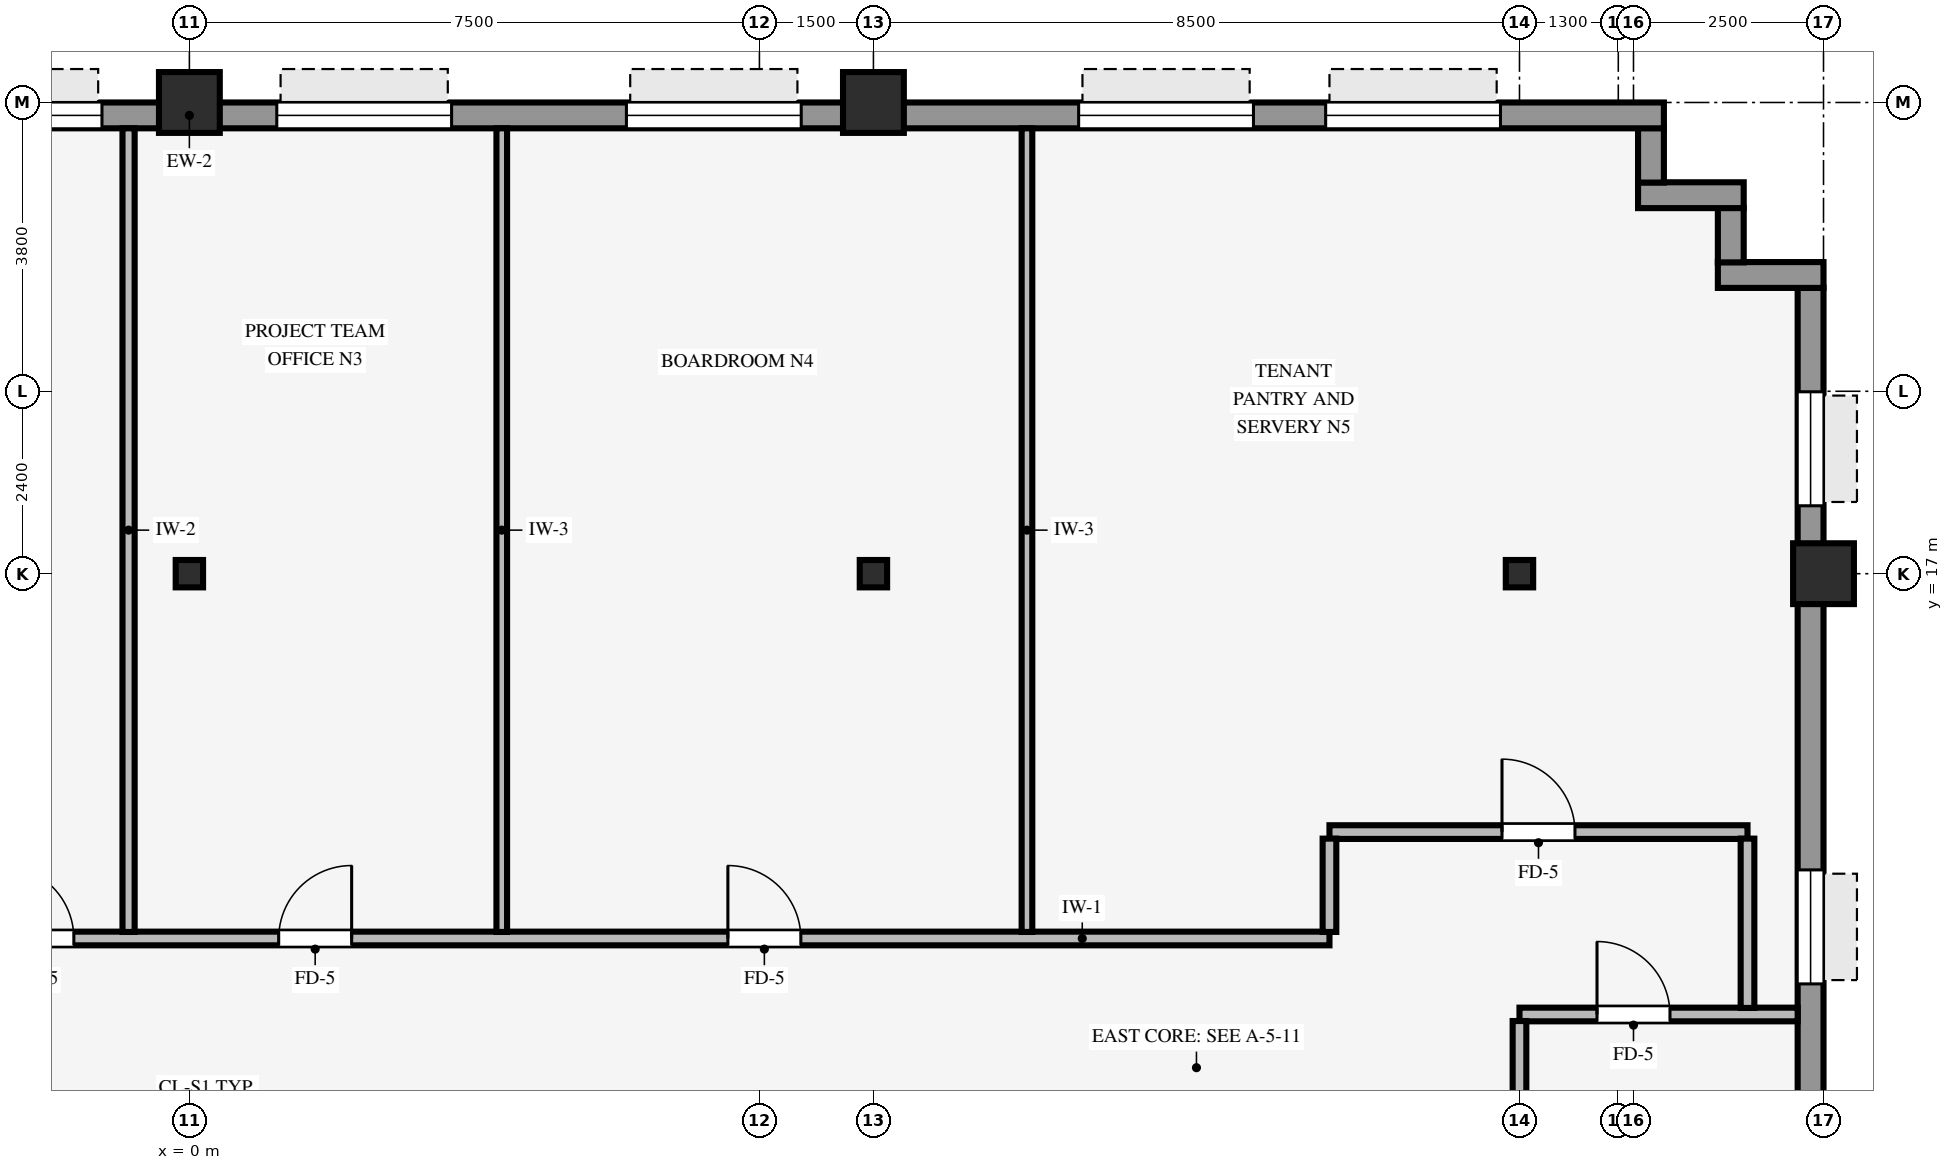
"""IFC4 building model, lengths in metres.
Left out: names, types, materials, properties, quantities, classifications, styles, units other than length and angle.
Written with IfcOpenShell. Run it as: python <this file> out.ifc"""

import sys

from ifc_helpers import new_model, si_unit, direction, frame, frame_2d, origin, origin_2d, place, context, subcontext, project, spatial, rectangle, hollow_rectangle, i_section, extrude, source, transform, mapped, element, fill, save


model = new_model("IFC4")
c1 = context("Model", 3, precision=1e-05, world=origin(), true_north=direction((0.0, 1.0)))
c2 = subcontext(c1, "Body", "Model", "MODEL_VIEW")
j1 = project(units=[si_unit("LENGTHUNIT", "METRE"), si_unit("PLANEANGLEUNIT", "RADIAN")], contexts=[c1])
p1 = place(None, origin())
s1 = spatial("IfcSite", under=j1, at=p1, CompositionType="ELEMENT")
p2 = place(p1, origin())
s2 = spatial("IfcBuilding", under=s1, at=p2, CompositionType="ELEMENT")
p3 = place(p2, frame((0.0, 0.0, 71.4)))
s3 = spatial("IfcBuildingStorey", under=s2, at=p3, CompositionType="ELEMENT", Elevation=71.4)
for number, where, z_axis, x_axis in (
    (1, (21.5, 17.0, 0.0), (0.0, 0.0, 1.0), (1.0, 0.0, 0.0)),
    (2, (0.0, 23.2, 0.0), (0.0, 0.0, 1.0), (1.0, 0.0, 0.0)),
    (3, (9.0, 23.2, 0.0), (0.0, 0.0, 1.0), (1.0, 0.0, 0.0)),
):
    element("IfcColumn", number, at=place(p3, frame(where, z_axis=z_axis, x_axis=x_axis)), inside=s3, PredefinedType="COLUMN", context=c2, shape_type="SweptSolid", body=[
        extrude(hollow_rectangle(XDim=0.8, YDim=0.8, WallThickness=0.055, InnerFilletRadius=0.055, OuterFilletRadius=0.11, at=origin_2d()), origin(), (0.0, 0.0, 1.0), 3.37),
    ])
for number, where, z_axis, x_axis in (
    (4, (0.0, 17.0, 0.0), (0.0, 0.0, 1.0), (1.0, 0.0, 0.0)),
    (5, (9.0, 17.0, 0.0), (0.0, 0.0, 1.0), (1.0, 0.0, 0.0)),
    (6, (17.5, 17.0, 0.0), (0.0, 0.0, 1.0), (1.0, 0.0, 0.0)),
):
    element("IfcColumn", number, at=place(p3, frame(where, z_axis=z_axis, x_axis=x_axis)), inside=s3, PredefinedType="COLUMN", context=c2, shape_type="SweptSolid", body=[
        extrude(i_section(OverallWidth=0.36, OverallDepth=0.36, WebThickness=0.021, FlangeThickness=0.021, FilletRadius=0.018, at=origin_2d()), origin(), (0.0, 0.0, 1.0), 3.37),
    ])
p4 = place(p3, frame((21.33, -20.764, 0.0), z_axis=(0.0, 0.0, 1.0), x_axis=(0.0, 1.0, 0.0)))
e7 = element("IfcWall", 7, at=p4, inside=s3, PredefinedType="STANDARD", context=c2, shape_type="SweptSolid", body=[
    extrude(rectangle(XDim=41.528, YDim=0.34, at=frame_2d((20.764, 0.0))), origin(), (0.0, 0.0, 1.0), 2.705),
])
p5 = place(p4, frame((26.014, 0.0, 0.0), z_axis=(0.0, 0.0, 1.0), x_axis=(-1.0, 0.0, 0.0)))
e8 = element("IfcOpeningElement", 8, at=p5, cuts=e7, PredefinedType="OPENING", context=c2, shape_type="SweptSolid", body=[
    extrude(rectangle(XDim=1.05, YDim=2.1, at=frame_2d((0.525, 1.05))), frame((0.0, 0.18, 0.0), z_axis=(0.0, -1.0, 0.0), x_axis=(1.0, 0.0, 0.0)), (0.0, 0.0, 1.0), 0.36),
])
p6 = place(p4, frame((1.371, 0.0, 0.8)))
e9 = element("IfcOpeningElement", 9, at=p6, cuts=e7, PredefinedType="OPENING", context=c2, shape_type="SweptSolid", body=[
    extrude(rectangle(XDim=1.5, YDim=1.6, at=frame_2d((0.75, 0.8))), frame((0.0, 0.18, 0.0), z_axis=(0.0, -1.0, 0.0), x_axis=(1.0, 0.0, 0.0)), (0.0, 0.0, 1.0), 0.36),
])
p7 = place(p4, frame((7.662, 0.0, 0.8)))
e10 = element("IfcOpeningElement", 10, at=p7, cuts=e7, PredefinedType="OPENING", context=c2, shape_type="SweptSolid", body=[
    extrude(rectangle(XDim=1.5, YDim=1.6, at=frame_2d((0.75, 0.8))), frame((0.0, 0.18, 0.0), z_axis=(0.0, -1.0, 0.0), x_axis=(1.0, 0.0, 0.0)), (0.0, 0.0, 1.0), 0.36),
])
p8 = place(p4, frame((12.603, 0.0, 0.8)))
e11 = element("IfcOpeningElement", 11, at=p8, cuts=e7, PredefinedType="OPENING", context=c2, shape_type="SweptSolid", body=[
    extrude(rectangle(XDim=1.5, YDim=1.6, at=frame_2d((0.75, 0.8))), frame((0.0, 0.18, 0.0), z_axis=(0.0, -1.0, 0.0), x_axis=(1.0, 0.0, 0.0)), (0.0, 0.0, 1.0), 0.36),
])
p9 = place(p4, frame((17.543, 0.0, 0.8)))
e12 = element("IfcOpeningElement", 12, at=p9, cuts=e7, PredefinedType="OPENING", context=c2, shape_type="SweptSolid", body=[
    extrude(rectangle(XDim=1.5, YDim=1.6, at=frame_2d((0.75, 0.8))), frame((0.0, 0.18, 0.0), z_axis=(0.0, -1.0, 0.0), x_axis=(1.0, 0.0, 0.0)), (0.0, 0.0, 1.0), 0.36),
])
p10 = place(p4, frame((22.485, 0.0, 0.8)))
e13 = element("IfcOpeningElement", 13, at=p10, cuts=e7, PredefinedType="OPENING", context=c2, shape_type="SweptSolid", body=[
    extrude(rectangle(XDim=1.5, YDim=1.6, at=frame_2d((0.75, 0.8))), frame((0.0, 0.18, 0.0), z_axis=(0.0, -1.0, 0.0), x_axis=(1.0, 0.0, 0.0)), (0.0, 0.0, 1.0), 0.36),
])
p11 = place(p4, frame((27.426, 0.0, 0.8)))
e14 = element("IfcOpeningElement", 14, at=p11, cuts=e7, PredefinedType="OPENING", context=c2, shape_type="SweptSolid", body=[
    extrude(rectangle(XDim=1.5, YDim=1.6, at=frame_2d((0.75, 0.8))), frame((0.0, 0.18, 0.0), z_axis=(0.0, -1.0, 0.0), x_axis=(1.0, 0.0, 0.0)), (0.0, 0.0, 1.0), 0.36),
])
p12 = place(p4, frame((32.366, 0.0, 0.8)))
e15 = element("IfcOpeningElement", 15, at=p12, cuts=e7, PredefinedType="OPENING", context=c2, shape_type="SweptSolid", body=[
    extrude(rectangle(XDim=1.5, YDim=1.6, at=frame_2d((0.75, 0.8))), frame((0.0, 0.18, 0.0), z_axis=(0.0, -1.0, 0.0), x_axis=(1.0, 0.0, 0.0)), (0.0, 0.0, 1.0), 0.36),
])
p13 = place(p4, frame((38.657, 0.0, 0.8)))
e16 = element("IfcOpeningElement", 16, at=p13, cuts=e7, PredefinedType="OPENING", context=c2, shape_type="SweptSolid", body=[
    extrude(rectangle(XDim=1.5, YDim=1.6, at=frame_2d((0.75, 0.8))), frame((0.0, 0.18, 0.0), z_axis=(0.0, -1.0, 0.0), x_axis=(1.0, 0.0, 0.0)), (0.0, 0.0, 1.0), 0.36),
])
p14 = place(p3, frame((20.11, 20.93, 0.0), z_axis=(0.0, 0.0, 1.0), x_axis=(1.0, 0.0, 0.0)))
e17 = element("IfcWall", 17, at=p14, inside=s3, PredefinedType="STANDARD", context=c2, shape_type="SweptSolid", body=[
    extrude(rectangle(XDim=1.39, YDim=0.34, at=frame_2d((0.695, 0.0))), origin(), (0.0, 0.0, 1.0), 3.36),
])
p15 = place(p3, frame((20.28, 21.096, 0.0), z_axis=(0.0, 0.0, 1.0), x_axis=(0.0, 1.0, 0.0)))
e18 = element("IfcWall", 18, at=p15, inside=s3, PredefinedType="STANDARD", context=c2, shape_type="SweptSolid", body=[
    extrude(rectangle(XDim=0.718, YDim=0.34, at=frame_2d((0.359, 0.0))), origin(), (0.0, 0.0, 1.0), 3.36),
])
p16 = place(p3, frame((19.06, 21.98, 0.0), z_axis=(0.0, 0.0, 1.0), x_axis=(1.0, 0.0, 0.0)))
e19 = element("IfcWall", 19, at=p16, inside=s3, PredefinedType="STANDARD", context=c2, shape_type="SweptSolid", body=[
    extrude(rectangle(XDim=1.39, YDim=0.34, at=frame_2d((0.695, 0.0))), origin(), (0.0, 0.0, 1.0), 3.36),
])
p17 = place(p3, frame((19.23, 22.146, 0.0), z_axis=(0.0, 0.0, 1.0), x_axis=(0.0, 1.0, 0.0)))
e20 = element("IfcWall", 20, at=p17, inside=s3, PredefinedType="STANDARD", context=c2, shape_type="SweptSolid", body=[
    extrude(rectangle(XDim=0.718, YDim=0.34, at=frame_2d((0.359, 0.0))), origin(), (0.0, 0.0, 1.0), 3.36),
])
p18 = place(p3, frame((-19.4, 23.03, 0.0), z_axis=(0.0, 0.0, 1.0), x_axis=(1.0, 0.0, 0.0)))
e21 = element("IfcWall", 21, at=p18, inside=s3, PredefinedType="STANDARD", context=c2, shape_type="SweptSolid", body=[
    extrude(rectangle(XDim=38.8, YDim=0.34, at=frame_2d((19.4, 0.0))), origin(), (0.0, 0.0, 1.0), 2.705),
])
p19 = place(p18, frame((2.15, 0.0, 0.8)))
e22 = element("IfcOpeningElement", 22, at=p19, cuts=e21, PredefinedType="OPENING", context=c2, shape_type="SweptSolid", body=[
    extrude(rectangle(XDim=2.3, YDim=1.62, at=frame_2d((1.15, 0.81))), frame((0.0, 0.18, 0.0), z_axis=(0.0, -1.0, 0.0), x_axis=(1.0, 0.0, 0.0)), (0.0, 0.0, 1.0), 0.36),
])
p20 = place(p18, frame((6.75, 0.0, 0.8)))
e23 = element("IfcOpeningElement", 23, at=p20, cuts=e21, PredefinedType="OPENING", context=c2, shape_type="SweptSolid", body=[
    extrude(rectangle(XDim=2.3, YDim=1.62, at=frame_2d((1.15, 0.81))), frame((0.0, 0.18, 0.0), z_axis=(0.0, -1.0, 0.0), x_axis=(1.0, 0.0, 0.0)), (0.0, 0.0, 1.0), 0.36),
])
p21 = place(p18, frame((11.35, 0.0, 0.8)))
e24 = element("IfcOpeningElement", 24, at=p21, cuts=e21, PredefinedType="OPENING", context=c2, shape_type="SweptSolid", body=[
    extrude(rectangle(XDim=2.3, YDim=1.62, at=frame_2d((1.15, 0.81))), frame((0.0, 0.18, 0.0), z_axis=(0.0, -1.0, 0.0), x_axis=(1.0, 0.0, 0.0)), (0.0, 0.0, 1.0), 0.36),
])
p22 = place(p18, frame((15.95, 0.0, 0.8)))
e25 = element("IfcOpeningElement", 25, at=p22, cuts=e21, PredefinedType="OPENING", context=c2, shape_type="SweptSolid", body=[
    extrude(rectangle(XDim=2.3, YDim=1.62, at=frame_2d((1.15, 0.81))), frame((0.0, 0.18, 0.0), z_axis=(0.0, -1.0, 0.0), x_axis=(1.0, 0.0, 0.0)), (0.0, 0.0, 1.0), 0.36),
])
p23 = place(p18, frame((20.55, 0.0, 0.8)))
e26 = element("IfcOpeningElement", 26, at=p23, cuts=e21, PredefinedType="OPENING", context=c2, shape_type="SweptSolid", body=[
    extrude(rectangle(XDim=2.3, YDim=1.62, at=frame_2d((1.15, 0.81))), frame((0.0, 0.18, 0.0), z_axis=(0.0, -1.0, 0.0), x_axis=(1.0, 0.0, 0.0)), (0.0, 0.0, 1.0), 0.36),
])
p24 = place(p18, frame((25.15, 0.0, 0.8)))
e27 = element("IfcOpeningElement", 27, at=p24, cuts=e21, PredefinedType="OPENING", context=c2, shape_type="SweptSolid", body=[
    extrude(rectangle(XDim=2.3, YDim=1.62, at=frame_2d((1.15, 0.81))), frame((0.0, 0.18, 0.0), z_axis=(0.0, -1.0, 0.0), x_axis=(1.0, 0.0, 0.0)), (0.0, 0.0, 1.0), 0.36),
])
p25 = place(p18, frame((31.1, 0.0, 0.8)))
e28 = element("IfcOpeningElement", 28, at=p25, cuts=e21, PredefinedType="OPENING", context=c2, shape_type="SweptSolid", body=[
    extrude(rectangle(XDim=2.3, YDim=1.62, at=frame_2d((1.15, 0.81))), frame((0.0, 0.18, 0.0), z_axis=(0.0, -1.0, 0.0), x_axis=(1.0, 0.0, 0.0)), (0.0, 0.0, 1.0), 0.36),
])
p26 = place(p18, frame((34.35, 0.0, 0.8)))
e29 = element("IfcOpeningElement", 29, at=p26, cuts=e21, PredefinedType="OPENING", context=c2, shape_type="SweptSolid", body=[
    extrude(rectangle(XDim=2.3, YDim=1.62, at=frame_2d((1.15, 0.81))), frame((0.0, 0.18, 0.0), z_axis=(0.0, -1.0, 0.0), x_axis=(1.0, 0.0, 0.0)), (0.0, 0.0, 1.0), 0.36),
])
p27 = place(p3, frame((17.5, 11.2, 0.0), z_axis=(0.0, 0.0, 1.0), x_axis=(1.0, 0.0, 0.0)))
e30 = element("IfcWall", 30, at=p27, inside=s3, PredefinedType="PARTITIONING", context=c2, shape_type="SweptSolid", body=[
    extrude(rectangle(XDim=3.66, YDim=0.18, at=frame_2d((1.83, 0.0))), origin(), (0.0, 0.0, 1.0), 3.36),
])
p28 = place(p27, frame((1.02, 0.0, 0.0)))
e31 = element("IfcOpeningElement", 31, at=p28, cuts=e30, PredefinedType="OPENING", context=c2, shape_type="SweptSolid", body=[
    extrude(rectangle(XDim=0.96, YDim=2.1, at=frame_2d((0.48, 1.05))), frame((0.0, 0.1, 0.0), z_axis=(0.0, -1.0, 0.0), x_axis=(1.0, 0.0, 0.0)), (0.0, 0.0, 1.0), 0.2),
])
p29 = place(p3, frame((-15.0, 12.2, 0.0), z_axis=(0.0, 0.0, 1.0), x_axis=(1.0, 0.0, 0.0)))
e32 = element("IfcWall", 32, at=p29, inside=s3, PredefinedType="PARTITIONING", context=c2, shape_type="SweptSolid", body=[
    extrude(rectangle(XDim=30.0, YDim=0.18, at=frame_2d((15.0, 0.0))), origin(), (0.0, 0.0, 1.0), 3.36),
])
p30 = place(p29, frame((22.085, 0.0, 0.0)))
e33 = element("IfcOpeningElement", 33, at=p30, cuts=e32, PredefinedType="OPENING", context=c2, shape_type="SweptSolid", body=[
    extrude(rectangle(XDim=0.96, YDim=2.1, at=frame_2d((0.48, 1.05))), frame((0.0, 0.1, 0.0), z_axis=(0.0, -1.0, 0.0), x_axis=(1.0, 0.0, 0.0)), (0.0, 0.0, 1.0), 0.2),
])
p31 = place(p29, frame((16.175, 0.0, 0.0)))
e34 = element("IfcOpeningElement", 34, at=p31, cuts=e32, PredefinedType="OPENING", context=c2, shape_type="SweptSolid", body=[
    extrude(rectangle(XDim=0.96, YDim=2.1, at=frame_2d((0.48, 1.05))), frame((0.0, 0.1, 0.0), z_axis=(0.0, -1.0, 0.0), x_axis=(1.0, 0.0, 0.0)), (0.0, 0.0, 1.0), 0.2),
])
p32 = place(p29, frame((5.45, 0.0, 0.0)))
e35 = element("IfcOpeningElement", 35, at=p32, cuts=e32, PredefinedType="OPENING", context=c2, shape_type="SweptSolid", body=[
    extrude(rectangle(XDim=0.9, YDim=2.1, at=frame_2d((0.45, 1.05))), frame((0.0, 0.1, 0.0), z_axis=(0.0, -1.0, 0.0), x_axis=(1.0, 0.0, 0.0)), (0.0, 0.0, 1.0), 0.2),
])
p33 = place(p29, frame((2.85, 0.0, 0.0)))
e36 = element("IfcOpeningElement", 36, at=p33, cuts=e32, PredefinedType="OPENING", context=c2, shape_type="SweptSolid", body=[
    extrude(rectangle(XDim=0.9, YDim=2.1, at=frame_2d((0.45, 1.05))), frame((0.0, 0.1, 0.0), z_axis=(0.0, -1.0, 0.0), x_axis=(1.0, 0.0, 0.0)), (0.0, 0.0, 1.0), 0.2),
])
p34 = place(p29, frame((12.52, 0.0, 0.0)))
e37 = element("IfcOpeningElement", 37, at=p34, cuts=e32, PredefinedType="OPENING", context=c2, shape_type="SweptSolid", body=[
    extrude(rectangle(XDim=0.96, YDim=2.1, at=frame_2d((0.48, 1.05))), frame((0.0, 0.1, 0.0), z_axis=(0.0, -1.0, 0.0), x_axis=(1.0, 0.0, 0.0)), (0.0, 0.0, 1.0), 0.2),
])
p35 = place(p29, frame((7.95, 0.0, 0.0)))
e38 = element("IfcOpeningElement", 38, at=p35, cuts=e32, PredefinedType="OPENING", context=c2, shape_type="SweptSolid", body=[
    extrude(rectangle(XDim=0.9, YDim=2.1, at=frame_2d((0.45, 1.05))), frame((0.0, 0.1, 0.0), z_axis=(0.0, -1.0, 0.0), x_axis=(1.0, 0.0, 0.0)), (0.0, 0.0, 1.0), 0.2),
])
p36 = place(p3, frame((15.0, 13.6, 0.0), z_axis=(0.0, 0.0, 1.0), x_axis=(1.0, 0.0, 0.0)))
e39 = element("IfcWall", 39, at=p36, inside=s3, PredefinedType="PARTITIONING", context=c2, shape_type="SweptSolid", body=[
    extrude(rectangle(XDim=5.5, YDim=0.18, at=frame_2d((2.75, 0.0))), origin(), (0.0, 0.0, 1.0), 2.942),
])
p37 = place(p36, frame((2.27, 0.0, 0.0)))
e40 = element("IfcOpeningElement", 40, at=p37, cuts=e39, PredefinedType="OPENING", context=c2, shape_type="SweptSolid", body=[
    extrude(rectangle(XDim=0.96, YDim=2.1, at=frame_2d((0.48, 1.05))), frame((0.0, 0.1, 0.0), z_axis=(0.0, -1.0, 0.0), x_axis=(1.0, 0.0, 0.0)), (0.0, 0.0, 1.0), 0.2),
])
p38 = place(p3, frame((-0.8, 12.286, 0.0), z_axis=(0.0, 0.0, 1.0), x_axis=(0.0, 1.0, 0.0)))
e41 = element("IfcWall", 41, at=p38, inside=s3, PredefinedType="PARTITIONING", context=c2, shape_type="SweptSolid", body=[
    extrude(rectangle(XDim=10.574, YDim=0.16, at=frame_2d((5.287, 0.0))), origin(), (0.0, 0.0, 1.0), 3.36),
])
for number, where, z_axis, x_axis in (
    (42, (4.11, 12.286, 0.0), (0.0, 0.0, 1.0), (0.0, 1.0, 0.0)),
    (43, (11.02, 12.286, 0.0), (0.0, 0.0, 1.0), (0.0, 1.0, 0.0)),
):
    element("IfcWall", number, at=place(p3, frame(where, z_axis=z_axis, x_axis=x_axis)), inside=s3, PredefinedType="PARTITIONING", context=c2, shape_type="SweptSolid", body=[
        extrude(rectangle(XDim=10.574, YDim=0.14, at=frame_2d((5.287, 0.0))), origin(), (0.0, 0.0, 1.0), 3.36),
    ])
p39 = place(p3, frame((15.0, 12.286, 0.0), z_axis=(0.0, 0.0, 1.0), x_axis=(0.0, 1.0, 0.0)))
e44 = element("IfcWall", 44, at=p39, inside=s3, PredefinedType="PARTITIONING", context=c2, shape_type="SweptSolid", body=[
    extrude(rectangle(XDim=1.228, YDim=0.18, at=frame_2d((0.614, 0.0))), origin(), (0.0, 0.0, 1.0), 3.36),
])
p40 = place(p3, frame((17.5, 10.146, 0.0), z_axis=(0.0, 0.0, 1.0), x_axis=(0.0, 1.0, 0.0)))
e45 = element("IfcWall", 45, at=p40, inside=s3, PredefinedType="PARTITIONING", context=c2, shape_type="SweptSolid", body=[
    extrude(rectangle(XDim=0.968, YDim=0.18, at=frame_2d((0.484, 0.0))), origin(), (0.0, 0.0, 1.0), 2.738),
])
p41 = place(p3, frame((20.5, 11.286, 0.0), z_axis=(0.0, 0.0, 1.0), x_axis=(0.0, 1.0, 0.0)))
e46 = element("IfcWall", 46, at=p41, inside=s3, PredefinedType="PARTITIONING", context=c2, shape_type="SweptSolid", body=[
    extrude(rectangle(XDim=2.228, YDim=0.18, at=frame_2d((1.114, 0.0))), origin(), (0.0, 0.0, 1.0), 3.36),
])
m1 = source(origin(), c2, "Body", "SweptSolid", [
    extrude(rectangle(XDim=1.5, YDim=1.6, at=frame_2d((0.75, 0.8))), frame((0.0, 0.03, 0.0), z_axis=(0.0, -1.0, 0.0), x_axis=(1.0, 0.0, 0.0)), (0.0, 0.0, 1.0), 0.06),
])
p42 = place(p12, origin())
e47 = element("IfcWindow", 47, at=p42, inside=s3, PartitioningType="SINGLE_PANEL", PredefinedType="WINDOW", context=c2, shape_type="MappedRepresentation", body=[
    mapped(m1, transform((0.0, 0.0, 0.0), scale=1.0)),
])
fill(e15, e47)
p43 = place(p13, origin())
e48 = element("IfcWindow", 48, at=p43, inside=s3, PartitioningType="SINGLE_PANEL", PredefinedType="WINDOW", context=c2, shape_type="MappedRepresentation", body=[
    mapped(m1, transform((0.0, 0.0, 0.0), scale=1.0)),
])
fill(e16, e48)
m2 = source(origin(), c2, "Body", "SweptSolid", [
    extrude(rectangle(XDim=2.3, YDim=1.62, at=frame_2d((1.15, 0.81))), frame((0.0, 0.03, 0.0), z_axis=(0.0, -1.0, 0.0), x_axis=(1.0, 0.0, 0.0)), (0.0, 0.0, 1.0), 0.06),
])
p44 = place(p22, origin())
e49 = element("IfcWindow", 49, at=p44, inside=s3, PartitioningType="SINGLE_PANEL", PredefinedType="WINDOW", context=c2, shape_type="MappedRepresentation", body=[
    mapped(m2, transform((0.0, 0.0, 0.0), scale=1.0)),
])
fill(e25, e49)
p45 = place(p23, origin())
e50 = element("IfcWindow", 50, at=p45, inside=s3, PartitioningType="SINGLE_PANEL", PredefinedType="WINDOW", context=c2, shape_type="MappedRepresentation", body=[
    mapped(m2, transform((0.0, 0.0, 0.0), scale=1.0)),
])
fill(e26, e50)
p46 = place(p24, origin())
e51 = element("IfcWindow", 51, at=p46, inside=s3, PartitioningType="SINGLE_PANEL", PredefinedType="WINDOW", context=c2, shape_type="MappedRepresentation", body=[
    mapped(m2, transform((0.0, 0.0, 0.0), scale=1.0)),
])
fill(e27, e51)
p47 = place(p25, origin())
e52 = element("IfcWindow", 52, at=p47, inside=s3, PartitioningType="SINGLE_PANEL", PredefinedType="WINDOW", context=c2, shape_type="MappedRepresentation", body=[
    mapped(m2, transform((0.0, 0.0, 0.0), scale=1.0)),
])
fill(e28, e52)
p48 = place(p26, origin())
e53 = element("IfcWindow", 53, at=p48, inside=s3, PartitioningType="SINGLE_PANEL", PredefinedType="WINDOW", context=c2, shape_type="MappedRepresentation", body=[
    mapped(m2, transform((0.0, 0.0, 0.0), scale=1.0)),
])
fill(e29, e53)
m3 = source(origin(), c2, "Body", "SweptSolid", [
    extrude(rectangle(XDim=0.96, YDim=2.1, at=frame_2d((0.48, 1.05))), frame((0.0, 0.025, 0.0), z_axis=(0.0, -1.0, 0.0), x_axis=(1.0, 0.0, 0.0)), (0.0, 0.0, 1.0), 0.05),
])
p49 = place(p30, origin())
e54 = element("IfcDoor", 54, at=p49, inside=s3, OperationType="SINGLE_SWING_LEFT", PredefinedType="DOOR", context=c2, shape_type="MappedRepresentation", body=[
    mapped(m3, transform((0.0, 0.0, 0.0), scale=1.0)),
])
fill(e33, e54)
p50 = place(p37, origin())
e55 = element("IfcDoor", 55, at=p50, inside=s3, OperationType="SINGLE_SWING_LEFT", PredefinedType="DOOR", context=c2, shape_type="MappedRepresentation", body=[
    mapped(m3, transform((0.0, 0.0, 0.0), scale=1.0)),
])
fill(e40, e55)
p51 = place(p31, origin())
e56 = element("IfcDoor", 56, at=p51, inside=s3, OperationType="SINGLE_SWING_RIGHT", PredefinedType="DOOR", context=c2, shape_type="MappedRepresentation", body=[
    mapped(m3, transform((0.0, 0.0, 0.0), scale=1.0)),
])
fill(e34, e56)
p52 = place(p28, origin())
e57 = element("IfcDoor", 57, at=p52, inside=s3, OperationType="SINGLE_SWING_LEFT", PredefinedType="DOOR", context=c2, shape_type="MappedRepresentation", body=[
    mapped(m3, transform((0.0, 0.0, 0.0), scale=1.0)),
])
fill(e31, e57)
p53 = place(p34, origin())
e58 = element("IfcDoor", 58, at=p53, inside=s3, OperationType="SINGLE_SWING_LEFT", PredefinedType="DOOR", context=c2, shape_type="MappedRepresentation", body=[
    mapped(m3, transform((0.0, 0.0, 0.0), scale=1.0)),
])
fill(e37, e58)
save(model, sys.argv[1])
